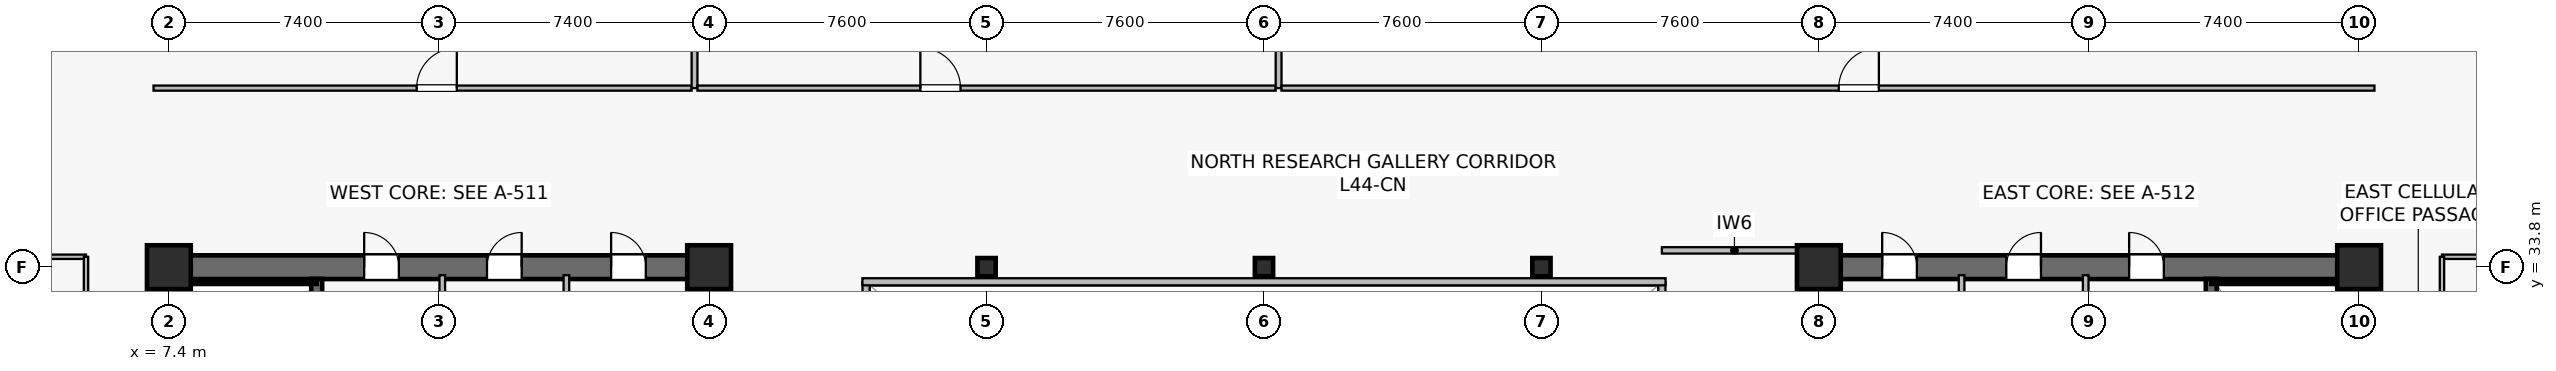
"""IFC4 building model, lengths in metres.
Left out: names, types, materials, properties, quantities, classifications, styles, units other than length and angle.
Written with IfcOpenShell. Run it as: python <this file> out.ifc"""

import sys

from ifc_helpers import new_model, si_unit, direction, frame, frame_2d, origin, origin_2d, place, context, subcontext, project, spatial, rectangle, hollow_rectangle, extrude, source, transform, mapped, element, fill, save


model = new_model("IFC4")
c1 = context("Model", 3, precision=1e-05, world=origin(), true_north=direction((0.0, 1.0)))
c2 = subcontext(c1, "Body", "Model", "MODEL_VIEW")
j1 = project(units=[si_unit("LENGTHUNIT", "METRE"), si_unit("PLANEANGLEUNIT", "RADIAN")], contexts=[c1])
p1 = place(None, origin())
s1 = spatial("IfcSite", under=j1, at=p1, CompositionType="ELEMENT")
p2 = place(p1, origin())
s2 = spatial("IfcBuilding", under=s1, at=p2, CompositionType="ELEMENT")
p3 = place(p2, frame((0.0, 0.0, 183.0)))
s3 = spatial("IfcBuildingStorey", under=s2, at=p3, CompositionType="ELEMENT", Elevation=183.0)
p4 = place(p3, frame((7.075, 33.8, 0.0), z_axis=(0.0, 0.0, 1.0), x_axis=(1.0, 0.0, 0.0)))
e1 = element("IfcWall", 1, at=p4, inside=s3, PredefinedType="SHEAR", context=c2, shape_type="SweptSolid", body=[
    extrude(rectangle(XDim=15.45, YDim=0.65, at=frame_2d((7.725, 0.0))), origin(), (0.0, 0.0, 1.0), 3.79),
])
p5 = place(p4, frame((5.675, 0.0, 0.0)))
e2 = element("IfcOpeningElement", 2, at=p5, cuts=e1, PredefinedType="OPENING", context=c2, shape_type="SweptSolid", body=[
    extrude(rectangle(XDim=0.95, YDim=2.15, at=frame_2d((0.475, 1.075))), frame((0.0, 0.335, 0.0), z_axis=(0.0, -1.0, 0.0), x_axis=(1.0, 0.0, 0.0)), (0.0, 0.0, 1.0), 0.67),
])
p6 = place(p4, frame((9.04, 0.0, 0.0)))
e3 = element("IfcOpeningElement", 3, at=p6, cuts=e1, PredefinedType="OPENING", context=c2, shape_type="SweptSolid", body=[
    extrude(rectangle(XDim=0.95, YDim=2.15, at=frame_2d((0.475, 1.075))), frame((0.0, 0.335, 0.0), z_axis=(0.0, -1.0, 0.0), x_axis=(1.0, 0.0, 0.0)), (0.0, 0.0, 1.0), 0.67),
])
p7 = place(p4, frame((12.44, 0.0, 0.0)))
e4 = element("IfcOpeningElement", 4, at=p7, cuts=e1, PredefinedType="OPENING", context=c2, shape_type="SweptSolid", body=[
    extrude(rectangle(XDim=0.95, YDim=2.15, at=frame_2d((0.475, 1.075))), frame((0.0, 0.335, 0.0), z_axis=(0.0, -1.0, 0.0), x_axis=(1.0, 0.0, 0.0)), (0.0, 0.0, 1.0), 0.67),
])
p8 = place(p3, frame((7.4, 15.125, 0.0), z_axis=(0.0, 0.0, 1.0), x_axis=(0.0, 1.0, 0.0)))
e5 = element("IfcWall", 5, at=p8, inside=s3, PredefinedType="SHEAR", context=c2, shape_type="SweptSolid", body=[
    extrude(rectangle(XDim=18.35, YDim=0.65, at=frame_2d((9.175, 0.0))), origin(), (0.0, 0.0, 1.0), 3.79),
])
p9 = place(p3, frame((22.2, 15.125, 0.0), z_axis=(0.0, 0.0, 1.0), x_axis=(0.0, 1.0, 0.0)))
e6 = element("IfcWall", 6, at=p9, inside=s3, PredefinedType="SHEAR", context=c2, shape_type="SweptSolid", body=[
    extrude(rectangle(XDim=18.35, YDim=0.65, at=frame_2d((9.175, 0.0))), origin(), (0.0, 0.0, 1.0), 3.79),
])
p10 = place(p9, frame((3.425, 0.0, 0.0)))
e7 = element("IfcOpeningElement", 7, at=p10, cuts=e6, PredefinedType="OPENING", context=c2, shape_type="SweptSolid", body=[
    extrude(rectangle(XDim=1.42, YDim=2.2, at=frame_2d((0.71, 1.1))), frame((0.0, 0.335, 0.0), z_axis=(0.0, -1.0, 0.0), x_axis=(1.0, 0.0, 0.0)), (0.0, 0.0, 1.0), 0.67),
])
p11 = place(p3, frame((11.45, 24.85, 0.0), z_axis=(0.0, 0.0, 1.0), x_axis=(0.0, 1.0, 0.0)))
e8 = element("IfcWall", 8, at=p11, inside=s3, PredefinedType="SHEAR", context=c2, shape_type="SweptSolid", body=[
    extrude(rectangle(XDim=8.63, YDim=0.3, at=frame_2d((4.315, 0.0))), origin(), (0.0, 0.0, 1.0), 3.79),
])
p12 = place(p11, frame((0.42, 0.0, 0.0)))
e9 = element("IfcOpeningElement", 9, at=p12, cuts=e8, PredefinedType="OPENING", context=c2, shape_type="SweptSolid", body=[
    extrude(rectangle(XDim=1.1, YDim=2.15, at=frame_2d((0.55, 1.075))), frame((0.0, 0.16, 0.0), z_axis=(0.0, -1.0, 0.0), x_axis=(1.0, 0.0, 0.0)), (0.0, 0.0, 1.0), 0.32),
])
p13 = place(p3, frame((7.73, 33.4, 0.0), z_axis=(0.0, 0.0, 1.0), x_axis=(1.0, 0.0, 0.0)))
e10 = element("IfcWall", 10, at=p13, inside=s3, PredefinedType="SOLIDWALL", context=c2, shape_type="SweptSolid", body=[
    extrude(rectangle(XDim=3.72, YDim=0.12, at=frame_2d((1.86, 0.0))), origin(), (0.0, 0.0, 1.0), 3.79),
])
p14 = place(p3, frame((7.73, 25.0, 0.0), z_axis=(0.0, 0.0, 1.0), x_axis=(0.0, 1.0, 0.0)))
e11 = element("IfcWall", 11, at=p14, inside=s3, PredefinedType="SOLIDWALL", context=c2, shape_type="SweptSolid", body=[
    extrude(rectangle(XDim=8.32, YDim=0.12, at=frame_2d((4.16, 0.0))), origin(), (0.0, 0.0, 1.0), 3.79),
])
p15 = place(p3, frame((52.275, 33.8, 0.0), z_axis=(0.0, 0.0, 1.0), x_axis=(1.0, 0.0, 0.0)))
e12 = element("IfcWall", 12, at=p15, inside=s3, PredefinedType="SHEAR", context=c2, shape_type="SweptSolid", body=[
    extrude(rectangle(XDim=15.45, YDim=0.65, at=frame_2d((7.725, 0.0))), origin(), (0.0, 0.0, 1.0), 3.79),
])
p16 = place(p15, frame((8.825, 0.0, 0.0)))
e13 = element("IfcOpeningElement", 13, at=p16, cuts=e12, PredefinedType="OPENING", context=c2, shape_type="SweptSolid", body=[
    extrude(rectangle(XDim=0.95, YDim=2.15, at=frame_2d((0.475, 1.075))), frame((0.0, 0.335, 0.0), z_axis=(0.0, -1.0, 0.0), x_axis=(1.0, 0.0, 0.0)), (0.0, 0.0, 1.0), 0.67),
])
p17 = place(p15, frame((5.46, 0.0, 0.0)))
e14 = element("IfcOpeningElement", 14, at=p17, cuts=e12, PredefinedType="OPENING", context=c2, shape_type="SweptSolid", body=[
    extrude(rectangle(XDim=0.95, YDim=2.15, at=frame_2d((0.475, 1.075))), frame((0.0, 0.335, 0.0), z_axis=(0.0, -1.0, 0.0), x_axis=(1.0, 0.0, 0.0)), (0.0, 0.0, 1.0), 0.67),
])
p18 = place(p15, frame((2.06, 0.0, 0.0)))
e15 = element("IfcOpeningElement", 15, at=p18, cuts=e12, PredefinedType="OPENING", context=c2, shape_type="SweptSolid", body=[
    extrude(rectangle(XDim=0.95, YDim=2.15, at=frame_2d((0.475, 1.075))), frame((0.0, 0.335, 0.0), z_axis=(0.0, -1.0, 0.0), x_axis=(1.0, 0.0, 0.0)), (0.0, 0.0, 1.0), 0.67),
])
p19 = place(p3, frame((52.6, 15.125, 0.0), z_axis=(0.0, 0.0, 1.0), x_axis=(0.0, 1.0, 0.0)))
e16 = element("IfcWall", 16, at=p19, inside=s3, PredefinedType="SHEAR", context=c2, shape_type="SweptSolid", body=[
    extrude(rectangle(XDim=18.35, YDim=0.65, at=frame_2d((9.175, 0.0))), origin(), (0.0, 0.0, 1.0), 3.79),
])
p20 = place(p19, frame((3.425, 0.0, 0.0)))
e17 = element("IfcOpeningElement", 17, at=p20, cuts=e16, PredefinedType="OPENING", context=c2, shape_type="SweptSolid", body=[
    extrude(rectangle(XDim=1.42, YDim=2.2, at=frame_2d((0.71, 1.1))), frame((0.0, 0.335, 0.0), z_axis=(0.0, -1.0, 0.0), x_axis=(1.0, 0.0, 0.0)), (0.0, 0.0, 1.0), 0.67),
])
p21 = place(p3, frame((67.4, 15.125, 0.0), z_axis=(0.0, 0.0, 1.0), x_axis=(0.0, 1.0, 0.0)))
e18 = element("IfcWall", 18, at=p21, inside=s3, PredefinedType="SHEAR", context=c2, shape_type="SweptSolid", body=[
    extrude(rectangle(XDim=18.35, YDim=0.65, at=frame_2d((9.175, 0.0))), origin(), (0.0, 0.0, 1.0), 3.79),
])
p22 = place(p3, frame((63.35, 24.85, 0.0), z_axis=(0.0, 0.0, 1.0), x_axis=(0.0, 1.0, 0.0)))
e19 = element("IfcWall", 19, at=p22, inside=s3, PredefinedType="SHEAR", context=c2, shape_type="SweptSolid", body=[
    extrude(rectangle(XDim=8.63, YDim=0.3, at=frame_2d((4.315, 0.0))), origin(), (0.0, 0.0, 1.0), 3.79),
])
p23 = place(p22, frame((0.42, 0.0, 0.0)))
e20 = element("IfcOpeningElement", 20, at=p23, cuts=e19, PredefinedType="OPENING", context=c2, shape_type="SweptSolid", body=[
    extrude(rectangle(XDim=1.1, YDim=2.15, at=frame_2d((0.55, 1.075))), frame((0.0, 0.16, 0.0), z_axis=(0.0, -1.0, 0.0), x_axis=(1.0, 0.0, 0.0)), (0.0, 0.0, 1.0), 0.32),
])
p24 = place(p3, frame((63.35, 33.4, 0.0), z_axis=(0.0, 0.0, 1.0), x_axis=(1.0, 0.0, 0.0)))
e21 = element("IfcWall", 21, at=p24, inside=s3, PredefinedType="SOLIDWALL", context=c2, shape_type="SweptSolid", body=[
    extrude(rectangle(XDim=3.72, YDim=0.12, at=frame_2d((1.86, 0.0))), origin(), (0.0, 0.0, 1.0), 3.79),
])
p25 = place(p3, frame((67.07, 25.0, 0.0), z_axis=(0.0, 0.0, 1.0), x_axis=(0.0, 1.0, 0.0)))
e22 = element("IfcWall", 22, at=p25, inside=s3, PredefinedType="SOLIDWALL", context=c2, shape_type="SweptSolid", body=[
    extrude(rectangle(XDim=8.32, YDim=0.12, at=frame_2d((4.16, 0.0))), origin(), (0.0, 0.0, 1.0), 3.79),
])
m1 = source(origin(), c2, "Body", "SweptSolid", [
    extrude(rectangle(XDim=1.2, YDim=1.2, at=origin_2d()), origin(), (0.0, 0.0, 1.0), 4.1),
])
for number, where, z_axis, x_axis in (
    (23, (7.4, 33.8, 0.0), (0.0, 0.0, 1.0), (1.0, 0.0, 0.0)),
    (24, (22.2, 33.8, 0.0), (0.0, 0.0, 1.0), (1.0, 0.0, 0.0)),
    (25, (52.6, 33.8, 0.0), (0.0, 0.0, 1.0), (1.0, 0.0, 0.0)),
    (26, (67.4, 33.8, 0.0), (0.0, 0.0, 1.0), (1.0, 0.0, 0.0)),
):
    element("IfcColumn", number, at=place(p3, frame(where, z_axis=z_axis, x_axis=x_axis)), inside=s3, PredefinedType="COLUMN", context=c2, shape_type="MappedRepresentation", body=[
        mapped(m1, transform((0.0, 0.0, 0.0), scale=1.0)),
    ])
m2 = source(origin(), c2, "Body", "SweptSolid", [
    extrude(hollow_rectangle(XDim=0.5, YDim=0.5, WallThickness=0.022, at=origin_2d()), origin(), (0.0, 0.0, 1.0), 4.1),
])
for number, where, z_axis, x_axis in (
    (27, (29.8, 33.8, 0.0), (0.0, 0.0, 1.0), (1.0, 0.0, 0.0)),
    (28, (37.4, 33.8, 0.0), (0.0, 0.0, 1.0), (1.0, 0.0, 0.0)),
    (29, (45.0, 33.8, 0.0), (0.0, 0.0, 1.0), (1.0, 0.0, 0.0)),
):
    element("IfcColumn", number, at=place(p3, frame(where, z_axis=z_axis, x_axis=x_axis)), inside=s3, PredefinedType="COLUMN", context=c2, shape_type="MappedRepresentation", body=[
        mapped(m2, transform((0.0, 0.0, 0.0), scale=1.0)),
    ])
p26 = place(p3, frame((14.89, 29.65, 0.0), z_axis=(0.0, 0.0, 1.0), x_axis=(0.0, 1.0, 0.0)))
e30 = element("IfcWall", 30, at=p26, inside=s3, PredefinedType="PLUMBINGWALL", context=c2, shape_type="SweptSolid", body=[
    extrude(rectangle(XDim=3.93, YDim=0.155, at=frame_2d((1.965, 0.0))), origin(), (0.0, 0.0, 1.0), 3.187),
])
p27 = place(p3, frame((18.29, 29.65, 0.0), z_axis=(0.0, 0.0, 1.0), x_axis=(0.0, 1.0, 0.0)))
e31 = element("IfcWall", 31, at=p27, inside=s3, PredefinedType="PLUMBINGWALL", context=c2, shape_type="SweptSolid", body=[
    extrude(rectangle(XDim=3.93, YDim=0.155, at=frame_2d((1.965, 0.0))), origin(), (0.0, 0.0, 1.0), 3.79),
])
p28 = place(p3, frame((59.91, 29.65, 0.0), z_axis=(0.0, 0.0, 1.0), x_axis=(0.0, 1.0, 0.0)))
e32 = element("IfcWall", 32, at=p28, inside=s3, PredefinedType="PLUMBINGWALL", context=c2, shape_type="SweptSolid", body=[
    extrude(rectangle(XDim=3.93, YDim=0.155, at=frame_2d((1.965, 0.0))), origin(), (0.0, 0.0, 1.0), 3.187),
])
p29 = place(p3, frame((56.51, 29.65, 0.0), z_axis=(0.0, 0.0, 1.0), x_axis=(0.0, 1.0, 0.0)))
e33 = element("IfcWall", 33, at=p29, inside=s3, PredefinedType="PLUMBINGWALL", context=c2, shape_type="SweptSolid", body=[
    extrude(rectangle(XDim=3.93, YDim=0.155, at=frame_2d((1.965, 0.0))), origin(), (0.0, 0.0, 1.0), 3.79),
])
p30 = place(p3, frame((48.3, 34.26, 0.0), z_axis=(0.0, 0.0, 1.0), x_axis=(1.0, 0.0, 0.0)))
e34 = element("IfcWall", 34, at=p30, inside=s3, PredefinedType="PARTITIONING", context=c2, shape_type="SweptSolid", body=[
    extrude(rectangle(XDim=3.975, YDim=0.175, at=frame_2d((1.987, 0.0))), origin(), (0.0, 0.0, 1.0), 3.475),
])
p31 = place(p3, frame((26.5, 15.2, 0.0), z_axis=(0.0, 0.0, 1.0), x_axis=(0.0, 1.0, 0.0)))
e35 = element("IfcWall", 35, at=p31, inside=s3, PredefinedType="SOLIDWALL", context=c2, shape_type="SweptSolid", body=[
    extrude(rectangle(XDim=18.2, YDim=0.195, at=frame_2d((9.1, 0.0))), origin(), (0.0, 0.0, 1.0), 3.79),
])
p32 = place(p31, frame((1.8, 0.0, 0.9)))
e36 = element("IfcOpeningElement", 36, at=p32, cuts=e35, PredefinedType="OPENING", context=c2, shape_type="SweptSolid", body=[
    extrude(rectangle(XDim=1.5, YDim=1.4, at=frame_2d((0.75, 0.7))), frame((0.0, 0.107, 0.0), z_axis=(0.0, -1.0, 0.0), x_axis=(1.0, 0.0, 0.0)), (0.0, 0.0, 1.0), 0.215),
])
p33 = place(p31, frame((13.2, 0.0, 0.9)))
e37 = element("IfcOpeningElement", 37, at=p33, cuts=e35, PredefinedType="OPENING", context=c2, shape_type="SweptSolid", body=[
    extrude(rectangle(XDim=1.5, YDim=1.4, at=frame_2d((0.75, 0.7))), frame((0.0, 0.107, 0.0), z_axis=(0.0, -1.0, 0.0), x_axis=(1.0, 0.0, 0.0)), (0.0, 0.0, 1.0), 0.215),
])
p34 = place(p3, frame((48.3, 15.2, 0.0), z_axis=(0.0, 0.0, 1.0), x_axis=(0.0, 1.0, 0.0)))
e38 = element("IfcWall", 38, at=p34, inside=s3, PredefinedType="SOLIDWALL", context=c2, shape_type="SweptSolid", body=[
    extrude(rectangle(XDim=18.2, YDim=0.195, at=frame_2d((9.1, 0.0))), origin(), (0.0, 0.0, 1.0), 3.79),
])
p35 = place(p34, frame((1.8, 0.0, 0.9)))
e39 = element("IfcOpeningElement", 39, at=p35, cuts=e38, PredefinedType="OPENING", context=c2, shape_type="SweptSolid", body=[
    extrude(rectangle(XDim=1.5, YDim=1.4, at=frame_2d((0.75, 0.7))), frame((0.0, 0.107, 0.0), z_axis=(0.0, -1.0, 0.0), x_axis=(1.0, 0.0, 0.0)), (0.0, 0.0, 1.0), 0.215),
])
p36 = place(p34, frame((13.2, 0.0, 0.9)))
e40 = element("IfcOpeningElement", 40, at=p36, cuts=e38, PredefinedType="OPENING", context=c2, shape_type="SweptSolid", body=[
    extrude(rectangle(XDim=1.5, YDim=1.4, at=frame_2d((0.75, 0.7))), frame((0.0, 0.107, 0.0), z_axis=(0.0, -1.0, 0.0), x_axis=(1.0, 0.0, 0.0)), (0.0, 0.0, 1.0), 0.215),
])
p37 = place(p3, frame((26.4, 33.4, 0.0), z_axis=(0.0, 0.0, 1.0), x_axis=(1.0, 0.0, 0.0)))
e41 = element("IfcWall", 41, at=p37, inside=s3, PredefinedType="SOLIDWALL", context=c2, shape_type="SweptSolid", body=[
    extrude(rectangle(XDim=22.0, YDim=0.195, at=frame_2d((11.0, 0.0))), origin(), (0.0, 0.0, 1.0), 3.79),
])
p38 = place(p3, frame((6.98, 38.705, 0.0), z_axis=(0.0, 0.0, 1.0), x_axis=(1.0, 0.0, 0.0)))
e42 = element("IfcWall", 42, at=p38, inside=s3, PredefinedType="PARTITIONING", context=c2, shape_type="SweptSolid", body=[
    extrude(rectangle(XDim=14.74, YDim=0.14, at=frame_2d((7.37, 0.0))), origin(), (0.0, 0.0, 1.0), 3.187),
])
p39 = place(p38, frame((7.208, 0.0, 0.0)))
e43 = element("IfcOpeningElement", 43, at=p39, cuts=e42, PredefinedType="OPENING", context=c2, shape_type="SweptSolid", body=[
    extrude(rectangle(XDim=1.1, YDim=2.18, at=frame_2d((0.55, 1.09))), frame((0.0, 0.08, 0.0), z_axis=(0.0, -1.0, 0.0), x_axis=(1.0, 0.0, 0.0)), (0.0, 0.0, 1.0), 0.16),
])
p40 = place(p3, frame((21.8, 38.705, 0.0), z_axis=(0.0, 0.0, 1.0), x_axis=(0.0, 1.0, 0.0)))
e44 = element("IfcWall", 44, at=p40, inside=s3, PredefinedType="PARTITIONING", context=c2, shape_type="SweptSolid", body=[
    extrude(rectangle(XDim=8.485, YDim=0.16, at=frame_2d((4.242, 0.0))), origin(), (0.0, 0.0, 1.0), 3.075),
])
p41 = place(p3, frame((21.88, 38.705, 0.0), z_axis=(0.0, 0.0, 1.0), x_axis=(1.0, 0.0, 0.0)))
e45 = element("IfcWall", 45, at=p41, inside=s3, PredefinedType="PARTITIONING", context=c2, shape_type="SweptSolid", body=[
    extrude(rectangle(XDim=15.84, YDim=0.14, at=frame_2d((7.92, 0.0))), origin(), (0.0, 0.0, 1.0), 3.187),
])
p42 = place(p41, frame((6.106, 0.0, 0.0)))
e46 = element("IfcOpeningElement", 46, at=p42, cuts=e45, PredefinedType="OPENING", context=c2, shape_type="SweptSolid", body=[
    extrude(rectangle(XDim=1.1, YDim=2.18, at=frame_2d((0.55, 1.09))), frame((0.0, 0.08, 0.0), z_axis=(0.0, -1.0, 0.0), x_axis=(1.0, 0.0, 0.0)), (0.0, 0.0, 1.0), 0.16),
])
p43 = place(p3, frame((37.8, 38.705, 0.0), z_axis=(0.0, 0.0, 1.0), x_axis=(0.0, 1.0, 0.0)))
e47 = element("IfcWall", 47, at=p43, inside=s3, PredefinedType="PARTITIONING", context=c2, shape_type="SweptSolid", body=[
    extrude(rectangle(XDim=7.285, YDim=0.16, at=frame_2d((3.643, 0.0))), origin(), (0.0, 0.0, 1.0), 3.075),
])
p44 = place(p3, frame((37.88, 38.705, 0.0), z_axis=(0.0, 0.0, 1.0), x_axis=(1.0, 0.0, 0.0)))
e48 = element("IfcWall", 48, at=p44, inside=s3, PredefinedType="PARTITIONING", context=c2, shape_type="SweptSolid", body=[
    extrude(rectangle(XDim=29.94, YDim=0.14, at=frame_2d((14.97, 0.0))), origin(), (0.0, 0.0, 1.0), 3.187),
])
p45 = place(p44, frame((15.264, 0.0, 0.0)))
e49 = element("IfcOpeningElement", 49, at=p45, cuts=e48, PredefinedType="OPENING", context=c2, shape_type="SweptSolid", body=[
    extrude(rectangle(XDim=1.1, YDim=2.18, at=frame_2d((0.55, 1.09))), frame((0.0, 0.08, 0.0), z_axis=(0.0, -1.0, 0.0), x_axis=(1.0, 0.0, 0.0)), (0.0, 0.0, 1.0), 0.16),
])
p46 = place(p3, frame((2.11, 34.085, 0.0), z_axis=(0.0, 0.0, 1.0), x_axis=(1.0, 0.0, 0.0)))
e50 = element("IfcWall", 50, at=p46, inside=s3, PredefinedType="PARTITIONING", context=c2, shape_type="SweptSolid", body=[
    extrude(rectangle(XDim=3.02, YDim=0.12, at=frame_2d((1.51, 0.0))), origin(), (0.0, 0.0, 1.0), 3.79),
])
p47 = place(p3, frame((5.13, 14.515, 0.0), z_axis=(0.0, 0.0, 1.0), x_axis=(0.0, 1.0, 0.0)))
e51 = element("IfcWall", 51, at=p47, inside=s3, PredefinedType="PARTITIONING", context=c2, shape_type="SweptSolid", body=[
    extrude(rectangle(XDim=19.57, YDim=0.12, at=frame_2d((9.785, 0.0))), origin(), (0.0, 0.0, 1.0), 3.79),
])
p48 = place(p47, frame((9.335, 0.0, 0.0)))
e52 = element("IfcOpeningElement", 52, at=p48, cuts=e51, PredefinedType="OPENING", context=c2, shape_type="SweptSolid", body=[
    extrude(rectangle(XDim=0.9, YDim=2.1, at=frame_2d((0.45, 1.05))), frame((0.0, 0.07, 0.0), z_axis=(0.0, -1.0, 0.0), x_axis=(1.0, 0.0, 0.0)), (0.0, 0.0, 1.0), 0.14),
])
p49 = place(p3, frame((69.67, 34.085, 0.0), z_axis=(0.0, 0.0, 1.0), x_axis=(1.0, 0.0, 0.0)))
e53 = element("IfcWall", 53, at=p49, inside=s3, PredefinedType="PARTITIONING", context=c2, shape_type="SweptSolid", body=[
    extrude(rectangle(XDim=3.02, YDim=0.12, at=frame_2d((1.51, 0.0))), origin(), (0.0, 0.0, 1.0), 3.79),
])
p50 = place(p3, frame((69.67, 23.66, 0.0), z_axis=(0.0, 0.0, 1.0), x_axis=(0.0, 1.0, 0.0)))
e54 = element("IfcWall", 54, at=p50, inside=s3, PredefinedType="PARTITIONING", context=c2, shape_type="SweptSolid", body=[
    extrude(rectangle(XDim=10.425, YDim=0.12, at=frame_2d((5.212, 0.0))), origin(), (0.0, 0.0, 1.0), 3.79),
])
p51 = place(p50, frame((4.762, 0.0, 0.0)))
e55 = element("IfcOpeningElement", 55, at=p51, cuts=e54, PredefinedType="OPENING", context=c2, shape_type="SweptSolid", body=[
    extrude(rectangle(XDim=0.9, YDim=2.1, at=frame_2d((0.45, 1.05))), frame((0.0, 0.07, 0.0), z_axis=(0.0, -1.0, 0.0), x_axis=(1.0, 0.0, 0.0)), (0.0, 0.0, 1.0), 0.14),
])
m3 = source(origin(), c2, "Body", "SweptSolid", [
    extrude(rectangle(XDim=0.95, YDim=2.15, at=frame_2d((0.475, 1.075))), frame((0.0, 0.025, 0.0), z_axis=(0.0, -1.0, 0.0), x_axis=(1.0, 0.0, 0.0)), (0.0, 0.0, 1.0), 0.05),
])
p52 = place(p5, origin())
e56 = element("IfcDoor", 56, at=p52, inside=s3, OperationType="SINGLE_SWING_LEFT", PredefinedType="DOOR", context=c2, shape_type="MappedRepresentation", body=[
    mapped(m3, transform((0.0, 0.0, 0.0), scale=1.0)),
])
fill(e2, e56)
p53 = place(p6, origin())
e57 = element("IfcDoor", 57, at=p53, inside=s3, OperationType="SINGLE_SWING_RIGHT", PredefinedType="DOOR", context=c2, shape_type="MappedRepresentation", body=[
    mapped(m3, transform((0.0, 0.0, 0.0), scale=1.0)),
])
fill(e3, e57)
p54 = place(p7, origin())
e58 = element("IfcDoor", 58, at=p54, inside=s3, OperationType="SINGLE_SWING_LEFT", PredefinedType="DOOR", context=c2, shape_type="MappedRepresentation", body=[
    mapped(m3, transform((0.0, 0.0, 0.0), scale=1.0)),
])
fill(e4, e58)
p55 = place(p16, origin())
e59 = element("IfcDoor", 59, at=p55, inside=s3, OperationType="SINGLE_SWING_LEFT", PredefinedType="DOOR", context=c2, shape_type="MappedRepresentation", body=[
    mapped(m3, transform((0.0, 0.0, 0.0), scale=1.0)),
])
fill(e13, e59)
p56 = place(p17, origin())
e60 = element("IfcDoor", 60, at=p56, inside=s3, OperationType="SINGLE_SWING_RIGHT", PredefinedType="DOOR", context=c2, shape_type="MappedRepresentation", body=[
    mapped(m3, transform((0.0, 0.0, 0.0), scale=1.0)),
])
fill(e14, e60)
p57 = place(p18, origin())
e61 = element("IfcDoor", 61, at=p57, inside=s3, OperationType="SINGLE_SWING_LEFT", PredefinedType="DOOR", context=c2, shape_type="MappedRepresentation", body=[
    mapped(m3, transform((0.0, 0.0, 0.0), scale=1.0)),
])
fill(e15, e61)
m4 = source(origin(), c2, "Body", "SweptSolid", [
    extrude(rectangle(XDim=1.1, YDim=2.18, at=frame_2d((0.55, 1.09))), frame((0.0, 0.025, 0.0), z_axis=(0.0, -1.0, 0.0), x_axis=(1.0, 0.0, 0.0)), (0.0, 0.0, 1.0), 0.05),
])
p58 = place(p39, origin())
e62 = element("IfcDoor", 62, at=p58, inside=s3, OperationType="SINGLE_SWING_RIGHT", PredefinedType="DOOR", context=c2, shape_type="MappedRepresentation", body=[
    mapped(m4, transform((0.0, 0.0, 0.0), scale=1.0)),
])
fill(e43, e62)
p59 = place(p42, origin())
e63 = element("IfcDoor", 63, at=p59, inside=s3, OperationType="SINGLE_SWING_LEFT", PredefinedType="DOOR", context=c2, shape_type="MappedRepresentation", body=[
    mapped(m4, transform((0.0, 0.0, 0.0), scale=1.0)),
])
fill(e46, e63)
p60 = place(p45, origin())
e64 = element("IfcDoor", 64, at=p60, inside=s3, OperationType="SINGLE_SWING_RIGHT", PredefinedType="DOOR", context=c2, shape_type="MappedRepresentation", body=[
    mapped(m4, transform((0.0, 0.0, 0.0), scale=1.0)),
])
fill(e49, e64)
save(model, sys.argv[1])
